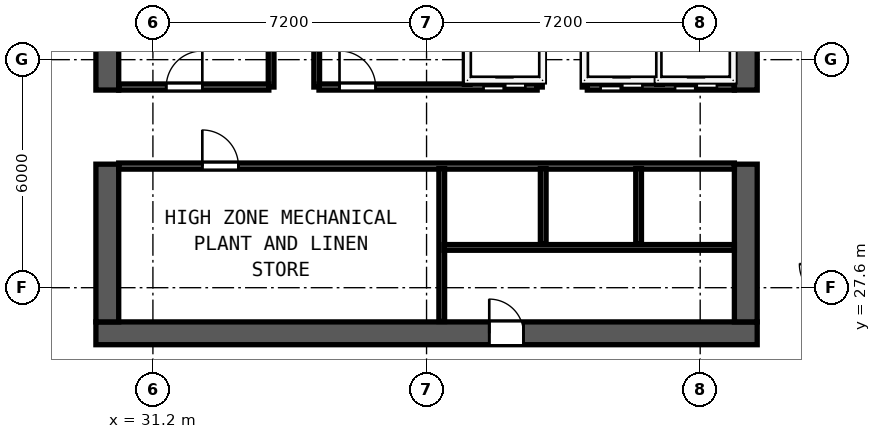
"""IFC4 building model, lengths in metres.
Left out: names, types, materials, properties, quantities, classifications, styles, units other than length and angle.
Written with IfcOpenShell. Run it as: python <this file> out.ifc"""

import sys

from ifc_helpers import new_model, si_unit, direction, frame, frame_2d, origin, place, context, subcontext, project, spatial, rectangle, extrude, element, fill, save


model = new_model("IFC4")
c1 = context("Model", 3, precision=1e-05, world=origin(), true_north=direction((0.0, 1.0)))
c2 = subcontext(c1, "Body", "Model", "MODEL_VIEW")
j1 = project(units=[si_unit("LENGTHUNIT", "METRE"), si_unit("PLANEANGLEUNIT", "RADIAN")], contexts=[c1])
p1 = place(None, origin())
s1 = spatial("IfcSite", under=j1, at=p1, CompositionType="ELEMENT")
p2 = place(p1, origin())
s2 = spatial("IfcBuilding", under=s1, at=p2, CompositionType="ELEMENT")
p3 = place(p2, frame((0.0, 0.0, 199.4)))
s3 = spatial("IfcBuildingStorey", under=s2, at=p3, CompositionType="ELEMENT", Elevation=199.4)
p4 = place(p3, frame((29.7, 26.4, 0.0), z_axis=(0.0, 0.0, 1.0), x_axis=(1.0, 0.0, 0.0)))
e1 = element("IfcWall", 1, at=p4, inside=s3, PredefinedType="SHEAR", context=c2, shape_type="SweptSolid", body=[
    extrude(rectangle(XDim=17.4, YDim=0.6, at=frame_2d((8.7, 0.0))), origin(), (0.0, 0.0, 1.0), 3.62),
])
p5 = place(p4, frame((11.25, 0.0, 0.0), z_axis=(0.0, 0.0, 1.0), x_axis=(-1.0, 0.0, 0.0)))
e2 = element("IfcOpeningElement", 2, at=p5, cuts=e1, PredefinedType="OPENING", context=c2, shape_type="SweptSolid", body=[
    extrude(rectangle(XDim=0.9, YDim=2.1, at=frame_2d((0.45, 1.05))), frame((0.0, 0.31, 0.0), z_axis=(0.0, -1.0, 0.0), x_axis=(1.0, 0.0, 0.0)), (0.0, 0.0, 1.0), 0.62),
])
p6 = place(p3, frame((30.0, 26.7, 0.0), z_axis=(0.0, 0.0, 1.0), x_axis=(0.0, 1.0, 0.0)))
e3 = element("IfcWall", 3, at=p6, inside=s3, PredefinedType="SHEAR", context=c2, shape_type="SweptSolid", body=[
    extrude(rectangle(XDim=4.15, YDim=0.6, at=frame_2d((2.075, 0.0))), origin(), (0.0, 0.0, 1.0), 3.62),
])
p7 = place(p3, frame((30.0, 32.8, 0.0), z_axis=(0.0, 0.0, 1.0), x_axis=(0.0, 1.0, 0.0)))
e4 = element("IfcWall", 4, at=p7, inside=s3, PredefinedType="SHEAR", context=c2, shape_type="SweptSolid", body=[
    extrude(rectangle(XDim=10.1, YDim=0.6, at=frame_2d((5.05, 0.0))), origin(), (0.0, 0.0, 1.0), 3.62),
])
p8 = place(p3, frame((46.8, 26.7, 0.0), z_axis=(0.0, 0.0, 1.0), x_axis=(0.0, 1.0, 0.0)))
e5 = element("IfcWall", 5, at=p8, inside=s3, PredefinedType="SHEAR", context=c2, shape_type="SweptSolid", body=[
    extrude(rectangle(XDim=4.15, YDim=0.6, at=frame_2d((2.075, 0.0))), origin(), (0.0, 0.0, 1.0), 3.62),
])
p9 = place(p3, frame((46.8, 32.8, 0.0), z_axis=(0.0, 0.0, 1.0), x_axis=(0.0, 1.0, 0.0)))
e6 = element("IfcWall", 6, at=p9, inside=s3, PredefinedType="SHEAR", context=c2, shape_type="SweptSolid", body=[
    extrude(rectangle(XDim=10.1, YDim=0.6, at=frame_2d((5.05, 0.0))), origin(), (0.0, 0.0, 1.0), 3.62),
])
for number, where, z_axis, x_axis in (
    (7, (34.31, 32.88, 0.0), (0.0, 0.0, 1.0), (0.0, 1.0, 0.0)),
    (8, (35.51, 32.88, 0.0), (0.0, 0.0, 1.0), (0.0, 1.0, 0.0)),
    (9, (41.37, 32.88, 0.0), (0.0, 0.0, 1.0), (0.0, 1.0, 0.0)),
    (10, (42.57, 32.88, 0.0), (0.0, 0.0, 1.0), (0.0, 1.0, 0.0)),
):
    element("IfcWall", number, at=place(p3, frame(where, z_axis=z_axis, x_axis=x_axis)), inside=s3, PredefinedType="SOLIDWALL", context=c2, shape_type="SweptSolid", body=[
        extrude(rectangle(XDim=2.17, YDim=0.15, at=frame_2d((1.085, 0.0))), origin(), (0.0, 0.0, 1.0), 3.62),
    ])
p10 = place(p3, frame((30.3, 32.88, 0.0), z_axis=(0.0, 0.0, 1.0), x_axis=(1.0, 0.0, 0.0)))
e11 = element("IfcWall", 11, at=p10, inside=s3, PredefinedType="SOLIDWALL", context=c2, shape_type="SweptSolid", body=[
    extrude(rectangle(XDim=3.95, YDim=0.16, at=frame_2d((1.975, 0.0))), origin(), (0.0, 0.0, 1.0), 3.62),
])
p11 = place(p10, frame((2.2, 0.0, 0.0), z_axis=(0.0, 0.0, 1.0), x_axis=(-1.0, 0.0, 0.0)))
e12 = element("IfcOpeningElement", 12, at=p11, cuts=e11, PredefinedType="OPENING", context=c2, shape_type="SweptSolid", body=[
    extrude(rectangle(XDim=0.95, YDim=2.12, at=frame_2d((0.475, 1.06))), frame((0.0, 0.09, 0.0), z_axis=(0.0, -1.0, 0.0), x_axis=(1.0, 0.0, 0.0)), (0.0, 0.0, 1.0), 0.18),
])
p12 = place(p3, frame((35.57, 32.88, 0.0), z_axis=(0.0, 0.0, 1.0), x_axis=(1.0, 0.0, 0.0)))
e13 = element("IfcWall", 13, at=p12, inside=s3, PredefinedType="SOLIDWALL", context=c2, shape_type="SweptSolid", body=[
    extrude(rectangle(XDim=5.74, YDim=0.16, at=frame_2d((2.87, 0.0))), origin(), (0.0, 0.0, 1.0), 3.62),
])
p13 = place(p12, frame((1.49, 0.0, 0.0), z_axis=(0.0, 0.0, 1.0), x_axis=(-1.0, 0.0, 0.0)))
e14 = element("IfcOpeningElement", 14, at=p13, cuts=e13, PredefinedType="OPENING", context=c2, shape_type="SweptSolid", body=[
    extrude(rectangle(XDim=0.95, YDim=2.12, at=frame_2d((0.475, 1.06))), frame((0.0, 0.09, 0.0), z_axis=(0.0, -1.0, 0.0), x_axis=(1.0, 0.0, 0.0)), (0.0, 0.0, 1.0), 0.18),
])
p14 = place(p12, frame((5.43, 0.0, 0.0), z_axis=(0.0, 0.0, 1.0), x_axis=(-1.0, 0.0, 0.0)))
e15 = element("IfcOpeningElement", 15, at=p14, cuts=e13, PredefinedType="OPENING", context=c2, shape_type="SweptSolid", body=[
    extrude(rectangle(XDim=1.1, YDim=2.2, at=frame_2d((0.55, 1.1))), frame((0.0, 0.09, 0.0), z_axis=(0.0, -1.0, 0.0), x_axis=(1.0, 0.0, 0.0)), (0.0, 0.0, 1.0), 0.18),
])
p15 = place(p3, frame((42.63, 32.88, 0.0), z_axis=(0.0, 0.0, 1.0), x_axis=(1.0, 0.0, 0.0)))
e16 = element("IfcWall", 16, at=p15, inside=s3, PredefinedType="SOLIDWALL", context=c2, shape_type="SweptSolid", body=[
    extrude(rectangle(XDim=3.87, YDim=0.16, at=frame_2d((1.935, 0.0))), origin(), (0.0, 0.0, 1.0), 3.62),
])
p16 = place(p15, frame((1.45, 0.0, 0.0), z_axis=(0.0, 0.0, 1.0), x_axis=(-1.0, 0.0, 0.0)))
e17 = element("IfcOpeningElement", 17, at=p16, cuts=e16, PredefinedType="OPENING", context=c2, shape_type="SweptSolid", body=[
    extrude(rectangle(XDim=1.1, YDim=2.2, at=frame_2d((0.55, 1.1))), frame((0.0, 0.09, 0.0), z_axis=(0.0, -1.0, 0.0), x_axis=(1.0, 0.0, 0.0)), (0.0, 0.0, 1.0), 0.18),
])
p17 = place(p15, frame((3.41, 0.0, 0.0), z_axis=(0.0, 0.0, 1.0), x_axis=(-1.0, 0.0, 0.0)))
e18 = element("IfcOpeningElement", 18, at=p17, cuts=e16, PredefinedType="OPENING", context=c2, shape_type="SweptSolid", body=[
    extrude(rectangle(XDim=1.1, YDim=2.2, at=frame_2d((0.55, 1.1))), frame((0.0, 0.09, 0.0), z_axis=(0.0, -1.0, 0.0), x_axis=(1.0, 0.0, 0.0)), (0.0, 0.0, 1.0), 0.18),
])
for number, where, z_axis, x_axis in (
    (19, (39.47, 32.95, 0.0), (0.0, 0.0, 1.0), (0.0, 1.0, 0.0)),
    (20, (44.53, 32.95, 0.0), (0.0, 0.0, 1.0), (0.0, 1.0, 0.0)),
):
    element("IfcWall", number, at=place(p3, frame(where, z_axis=z_axis, x_axis=x_axis)), inside=s3, PredefinedType="SOLIDWALL", context=c2, shape_type="SweptSolid", body=[
        extrude(rectangle(XDim=2.05, YDim=0.15, at=frame_2d((1.025, 0.0))), origin(), (0.0, 0.0, 1.0), 3.62),
    ])
p18 = place(p3, frame((30.3, 30.8, 0.0), z_axis=(0.0, 0.0, 1.0), x_axis=(1.0, 0.0, 0.0)))
e21 = element("IfcWall", 21, at=p18, inside=s3, PredefinedType="SOLIDWALL", context=c2, shape_type="SweptSolid", body=[
    extrude(rectangle(XDim=16.2, YDim=0.16, at=frame_2d((8.1, 0.0))), origin(), (0.0, 0.0, 1.0), 3.62),
])
p19 = place(p18, frame((2.2, 0.0, 0.0)))
e22 = element("IfcOpeningElement", 22, at=p19, cuts=e21, PredefinedType="OPENING", context=c2, shape_type="SweptSolid", body=[
    extrude(rectangle(XDim=0.95, YDim=2.12, at=frame_2d((0.475, 1.06))), frame((0.0, 0.09, 0.0), z_axis=(0.0, -1.0, 0.0), x_axis=(1.0, 0.0, 0.0)), (0.0, 0.0, 1.0), 0.18),
])
p20 = place(p3, frame((38.8, 26.71, 0.0), z_axis=(0.0, 0.0, 1.0), x_axis=(0.0, 1.0, 0.0)))
e23 = element("IfcWall", 23, at=p20, inside=s3, PredefinedType="SOLIDWALL", context=c2, shape_type="SweptSolid", body=[
    extrude(rectangle(XDim=4.025, YDim=0.15, at=frame_2d((2.013, 0.0))), origin(), (0.0, 0.0, 1.0), 3.62),
])
p21 = place(p3, frame((38.86, 28.66, 0.0), z_axis=(0.0, 0.0, 1.0), x_axis=(1.0, 0.0, 0.0)))
e24 = element("IfcWall", 24, at=p21, inside=s3, PredefinedType="PARTITIONING", context=c2, shape_type="SweptSolid", body=[
    extrude(rectangle(XDim=7.64, YDim=0.15, at=frame_2d((3.82, 0.0))), origin(), (0.0, 0.0, 1.0), 3.62),
])
for number, where, z_axis, x_axis in (
    (25, (41.47, 28.75, 0.0), (0.0, 0.0, 1.0), (0.0, 1.0, 0.0)),
    (26, (43.98, 28.75, 0.0), (0.0, 0.0, 1.0), (0.0, 1.0, 0.0)),
):
    element("IfcWall", number, at=place(p3, frame(where, z_axis=z_axis, x_axis=x_axis)), inside=s3, PredefinedType="SOLIDWALL", context=c2, shape_type="SweptSolid", body=[
        extrude(rectangle(XDim=1.985, YDim=0.15, at=frame_2d((0.993, 0.0))), origin(), (0.0, 0.0, 1.0), 3.62),
    ])
p22 = place(p11, origin())
e27 = element("IfcDoor", 27, at=p22, inside=s3, OperationType="SINGLE_SWING_LEFT", PredefinedType="DOOR", context=c2, shape_type="SweptSolid", body=[
    extrude(rectangle(XDim=0.95, YDim=2.12, at=frame_2d((0.475, 1.06))), frame((0.0, 0.025, 0.0), z_axis=(0.0, -1.0, 0.0), x_axis=(1.0, 0.0, 0.0)), (0.0, 0.0, 1.0), 0.05),
])
fill(e12, e27)
p23 = place(p13, origin())
e28 = element("IfcDoor", 28, at=p23, inside=s3, OperationType="SINGLE_SWING_RIGHT", PredefinedType="DOOR", context=c2, shape_type="SweptSolid", body=[
    extrude(rectangle(XDim=0.95, YDim=2.12, at=frame_2d((0.475, 1.06))), frame((0.0, 0.025, 0.0), z_axis=(0.0, -1.0, 0.0), x_axis=(1.0, 0.0, 0.0)), (0.0, 0.0, 1.0), 0.05),
])
fill(e14, e28)
p24 = place(p14, origin())
e29 = element("IfcDoor", 29, at=p24, inside=s3, OperationType="SLIDING_TO_RIGHT", PredefinedType="DOOR", context=c2, shape_type="SweptSolid", body=[
    extrude(rectangle(XDim=1.1, YDim=2.2, at=frame_2d((0.55, 1.1))), frame((0.0, 0.025, 0.0), z_axis=(0.0, -1.0, 0.0), x_axis=(1.0, 0.0, 0.0)), (0.0, 0.0, 1.0), 0.05),
])
fill(e15, e29)
p25 = place(p16, origin())
e30 = element("IfcDoor", 30, at=p25, inside=s3, OperationType="SLIDING_TO_RIGHT", PredefinedType="DOOR", context=c2, shape_type="SweptSolid", body=[
    extrude(rectangle(XDim=1.1, YDim=2.2, at=frame_2d((0.55, 1.1))), frame((0.0, 0.025, 0.0), z_axis=(0.0, -1.0, 0.0), x_axis=(1.0, 0.0, 0.0)), (0.0, 0.0, 1.0), 0.05),
])
fill(e17, e30)
p26 = place(p17, origin())
e31 = element("IfcDoor", 31, at=p26, inside=s3, OperationType="SLIDING_TO_RIGHT", PredefinedType="DOOR", context=c2, shape_type="SweptSolid", body=[
    extrude(rectangle(XDim=1.1, YDim=2.2, at=frame_2d((0.55, 1.1))), frame((0.0, 0.025, 0.0), z_axis=(0.0, -1.0, 0.0), x_axis=(1.0, 0.0, 0.0)), (0.0, 0.0, 1.0), 0.05),
])
fill(e18, e31)
p27 = place(p19, origin())
e32 = element("IfcDoor", 32, at=p27, inside=s3, OperationType="SINGLE_SWING_LEFT", PredefinedType="DOOR", context=c2, shape_type="SweptSolid", body=[
    extrude(rectangle(XDim=0.95, YDim=2.12, at=frame_2d((0.475, 1.06))), frame((0.0, 0.025, 0.0), z_axis=(0.0, -1.0, 0.0), x_axis=(1.0, 0.0, 0.0)), (0.0, 0.0, 1.0), 0.05),
])
fill(e22, e32)
p28 = place(p5, origin())
e33 = element("IfcDoor", 33, at=p28, inside=s3, OperationType="SINGLE_SWING_RIGHT", PredefinedType="DOOR", context=c2, shape_type="SweptSolid", body=[
    extrude(rectangle(XDim=0.9, YDim=2.1, at=frame_2d((0.45, 1.05))), frame((0.0, -0.195, 0.0), z_axis=(0.0, -1.0, 0.0), x_axis=(1.0, 0.0, 0.0)), (0.0, 0.0, 1.0), 0.05),
])
fill(e2, e33)
save(model, sys.argv[1])
